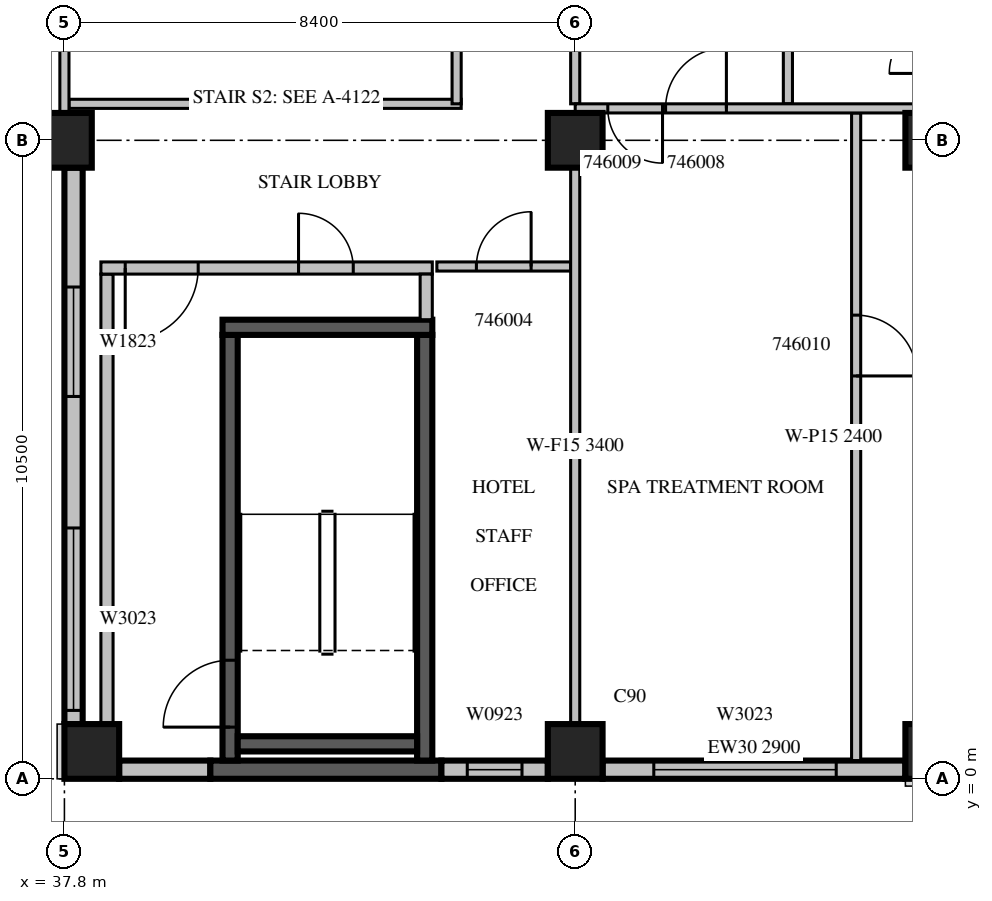
"""IFC4 building model, lengths in metres.
Left out: names, types, materials, properties, quantities, classifications, styles, units other than length and angle.
Written with IfcOpenShell. Run it as: python <this file> out.ifc"""

import sys

from ifc_helpers import new_model, si_unit, direction, frame, frame_2d, origin, origin_2d, place, context, subcontext, project, spatial, rectangle, extrude, source, transform, mapped, element, fill, save


model = new_model("IFC4")
c1 = context("Model", 3, precision=1e-05, world=origin(), true_north=direction((0.0, 1.0)))
c2 = subcontext(c1, "Body", "Model", "MODEL_VIEW")
j1 = project(units=[si_unit("LENGTHUNIT", "METRE"), si_unit("PLANEANGLEUNIT", "RADIAN")], contexts=[c1])
p1 = place(None, origin())
s1 = spatial("IfcSite", under=j1, at=p1, CompositionType="ELEMENT")
p2 = place(p1, origin())
s2 = spatial("IfcBuilding", under=s1, at=p2, CompositionType="ELEMENT")
p3 = place(p2, frame((0.0, 0.0, 208.2)))
s3 = spatial("IfcBuildingStorey", under=s2, at=p3, CompositionType="ELEMENT", Elevation=208.2)
m1 = source(origin(), c2, "Body", "SweptSolid", [
    extrude(rectangle(XDim=0.9, YDim=0.9, at=origin_2d()), origin(), (0.0, 0.0, 1.0), 3.8),
])
for number, where, z_axis, x_axis in (
    (1, (38.25, 0.45, 0.0), (0.0, 0.0, 1.0), (1.0, 0.0, 0.0)),
    (2, (46.2, 0.45, 0.0), (0.0, 0.0, 1.0), (1.0, 0.0, 0.0)),
    (3, (52.08, 0.45, 0.0), (0.0, 0.0, 1.0), (1.0, 0.0, 0.0)),
    (4, (37.8, 10.5, 0.0), (0.0, 0.0, 1.0), (1.0, 0.0, 0.0)),
    (5, (46.2, 10.5, 0.0), (0.0, 0.0, 1.0), (1.0, 0.0, 0.0)),
    (6, (52.08, 10.5, 0.0), (0.0, 0.0, 1.0), (1.0, 0.0, 0.0)),
):
    element("IfcColumn", number, at=place(p3, frame(where, z_axis=z_axis, x_axis=x_axis)), inside=s3, PredefinedType="COLUMN", context=c2, shape_type="MappedRepresentation", body=[
        mapped(m1, transform((0.0, 0.0, 0.0), scale=1.0)),
    ])
m2 = source(origin(), c2, "Body", "SweptSolid", [
    extrude(rectangle(XDim=9.15, YDim=0.3, at=frame_2d((4.575, 0.0))), origin(), (0.0, 0.0, 1.0), 3.4),
])
p4 = place(p3, frame((37.95, 10.05, 0.0), z_axis=(0.0, 0.0, 1.0), x_axis=(0.0, -1.0, 0.0)))
e7 = element("IfcWall", 7, at=p4, inside=s3, PredefinedType="STANDARD", context=c2, shape_type="MappedRepresentation", body=[
    mapped(m2, transform((0.0, 0.0, 0.0), scale=1.0)),
])
m3 = source(origin(), c2, "Body", "SweptSolid", [
    extrude(rectangle(XDim=1.8, YDim=2.3, at=frame_2d((0.9, 1.15))), frame((0.0, 0.16, 0.0), z_axis=(0.0, -1.0, 0.0), x_axis=(1.0, 0.0, 0.0)), (0.0, 0.0, 1.0), 0.32),
])
p5 = place(p4, frame((1.962, 0.0, 0.6)))
e8 = element("IfcOpeningElement", 8, at=p5, cuts=e7, PredefinedType="OPENING", context=c2, shape_type="MappedRepresentation", body=[
    mapped(m3, transform((0.0, 0.0, 0.0), scale=1.0)),
])
m4 = source(origin(), c2, "Body", "SweptSolid", [
    extrude(rectangle(XDim=3.0, YDim=2.3, at=frame_2d((1.5, 1.15))), frame((0.0, 0.16, 0.0), z_axis=(0.0, -1.0, 0.0), x_axis=(1.0, 0.0, 0.0)), (0.0, 0.0, 1.0), 0.32),
])
p6 = place(p4, frame((5.925, 0.0, 0.6)))
e9 = element("IfcOpeningElement", 9, at=p6, cuts=e7, PredefinedType="OPENING", context=c2, shape_type="MappedRepresentation", body=[
    mapped(m4, transform((0.0, 0.0, 0.0), scale=1.0)),
])
m5 = source(origin(), c2, "Body", "SweptSolid", [
    extrude(rectangle(XDim=1.5, YDim=0.3, at=frame_2d((0.75, 0.0))), origin(), (0.0, 0.0, 1.0), 3.4),
])
p7 = place(p3, frame((38.7, 0.15, 0.0), z_axis=(0.0, 0.0, 1.0), x_axis=(1.0, 0.0, 0.0)))
e10 = element("IfcWall", 10, at=p7, inside=s3, PredefinedType="STANDARD", context=c2, shape_type="MappedRepresentation", body=[
    mapped(m5, transform((0.0, 0.0, 0.0), scale=1.0)),
])
m6 = source(origin(), c2, "Body", "SweptSolid", [
    extrude(rectangle(XDim=3.8, YDim=0.3, at=frame_2d((1.9, 0.0))), origin(), (0.0, 0.0, 1.0), 3.4),
])
p8 = place(p3, frame((40.2, 0.15, 0.0), z_axis=(0.0, 0.0, 1.0), x_axis=(1.0, 0.0, 0.0)))
e11 = element("IfcWall", 11, at=p8, inside=s3, PredefinedType="SOLIDWALL", context=c2, shape_type="MappedRepresentation", body=[
    mapped(m6, transform((0.0, 0.0, 0.0), scale=1.0)),
])
m7 = source(origin(), c2, "Body", "SweptSolid", [
    extrude(rectangle(XDim=1.75, YDim=0.3, at=frame_2d((0.875, 0.0))), origin(), (0.0, 0.0, 1.0), 3.4),
])
p9 = place(p3, frame((44.0, 0.15, 0.0), z_axis=(0.0, 0.0, 1.0), x_axis=(1.0, 0.0, 0.0)))
e12 = element("IfcWall", 12, at=p9, inside=s3, PredefinedType="STANDARD", context=c2, shape_type="MappedRepresentation", body=[
    mapped(m7, transform((0.0, 0.0, 0.0), scale=1.0)),
])
m8 = source(origin(), c2, "Body", "SweptSolid", [
    extrude(rectangle(XDim=0.9, YDim=2.3, at=frame_2d((0.45, 1.15))), frame((0.0, 0.16, 0.0), z_axis=(0.0, -1.0, 0.0), x_axis=(1.0, 0.0, 0.0)), (0.0, 0.0, 1.0), 0.32),
])
p10 = place(p9, frame((0.425, 0.0, 0.6)))
e13 = element("IfcOpeningElement", 13, at=p10, cuts=e12, PredefinedType="OPENING", context=c2, shape_type="MappedRepresentation", body=[
    mapped(m8, transform((0.0, 0.0, 0.0), scale=1.0)),
])
m9 = source(origin(), c2, "Body", "SweptSolid", [
    extrude(rectangle(XDim=4.98, YDim=0.3, at=frame_2d((2.49, 0.0))), origin(), (0.0, 0.0, 1.0), 2.9),
])
p11 = place(p3, frame((46.65, 0.15, 0.0), z_axis=(0.0, 0.0, 1.0), x_axis=(1.0, 0.0, 0.0)))
e14 = element("IfcWall", 14, at=p11, inside=s3, PredefinedType="STANDARD", context=c2, shape_type="MappedRepresentation", body=[
    mapped(m9, transform((0.0, 0.0, 0.0), scale=1.0)),
])
p12 = place(p11, frame((0.843, 0.0, 0.6)))
e15 = element("IfcOpeningElement", 15, at=p12, cuts=e14, PredefinedType="OPENING", context=c2, shape_type="MappedRepresentation", body=[
    mapped(m4, transform((0.0, 0.0, 0.0), scale=1.0)),
])
m10 = source(origin(), c2, "Body", "SweptSolid", [
    extrude(rectangle(XDim=7.0, YDim=0.25, at=frame_2d((3.5, 0.0))), origin(), (0.0, 0.0, 1.0), 3.4),
])
p13 = place(p3, frame((40.525, 0.3, 0.0), z_axis=(0.0, 0.0, 1.0), x_axis=(0.0, 1.0, 0.0)))
e16 = element("IfcWall", 16, at=p13, inside=s3, PredefinedType="SOLIDWALL", context=c2, shape_type="MappedRepresentation", body=[
    mapped(m10, transform((0.0, 0.0, 0.0), scale=1.0)),
])
m11 = source(origin(), c2, "Body", "SweptSolid", [
    extrude(rectangle(XDim=1.1, YDim=2.1, at=frame_2d((0.55, 1.05))), frame((0.0, 0.135, 0.0), z_axis=(0.0, -1.0, 0.0), x_axis=(1.0, 0.0, 0.0)), (0.0, 0.0, 1.0), 0.27),
])
p14 = place(p13, frame((0.55, 0.0, 0.0)))
e17 = element("IfcOpeningElement", 17, at=p14, cuts=e16, PredefinedType="OPENING", context=c2, shape_type="MappedRepresentation", body=[
    mapped(m11, transform((0.0, 0.0, 0.0), scale=1.0)),
])
p15 = place(p3, frame((43.725, 0.3, 0.0), z_axis=(0.0, 0.0, 1.0), x_axis=(0.0, 1.0, 0.0)))
e18 = element("IfcWall", 18, at=p15, inside=s3, PredefinedType="SOLIDWALL", context=c2, shape_type="MappedRepresentation", body=[
    mapped(m10, transform((0.0, 0.0, 0.0), scale=1.0)),
])
m12 = source(origin(), c2, "Body", "SweptSolid", [
    extrude(rectangle(XDim=3.45, YDim=0.25, at=frame_2d((1.725, 0.0))), origin(), (0.0, 0.0, 1.0), 3.4),
])
p16 = place(p3, frame((40.4, 7.425, 0.0), z_axis=(0.0, 0.0, 1.0), x_axis=(1.0, 0.0, 0.0)))
e19 = element("IfcWall", 19, at=p16, inside=s3, PredefinedType="SOLIDWALL", context=c2, shape_type="MappedRepresentation", body=[
    mapped(m12, transform((0.0, 0.0, 0.0), scale=1.0)),
])
m13 = source(origin(), c2, "Body", "SweptSolid", [
    extrude(rectangle(XDim=2.95, YDim=0.25, at=frame_2d((1.475, 0.0))), origin(), (0.0, 0.0, 1.0), 3.4),
])
p17 = place(p3, frame((40.65, 0.575, 0.0), z_axis=(0.0, 0.0, 1.0), x_axis=(1.0, 0.0, 0.0)))
e20 = element("IfcWall", 20, at=p17, inside=s3, PredefinedType="SOLIDWALL", context=c2, shape_type="MappedRepresentation", body=[
    mapped(m13, transform((0.0, 0.0, 0.0), scale=1.0)),
])
m14 = source(origin(), c2, "Body", "SweptSolid", [
    extrude(rectangle(XDim=8.0, YDim=0.2, at=frame_2d((4.0, 0.0))), origin(), (0.0, 0.0, 1.0), 3.4),
])
p18 = place(p3, frame((38.5, 0.3, 0.0), z_axis=(0.0, 0.0, 1.0), x_axis=(0.0, 1.0, 0.0)))
e21 = element("IfcWall", 21, at=p18, inside=s3, PredefinedType="PARTITIONING", context=c2, shape_type="MappedRepresentation", body=[
    mapped(m14, transform((0.0, 0.0, 0.0), scale=1.0)),
])
m15 = source(origin(), c2, "Body", "SweptSolid", [
    extrude(rectangle(XDim=5.45, YDim=0.2, at=frame_2d((2.725, 0.0))), origin(), (0.0, 0.0, 1.0), 3.4),
])
p19 = place(p3, frame((38.4, 8.4, 0.0), z_axis=(0.0, 0.0, 1.0), x_axis=(1.0, 0.0, 0.0)))
e22 = element("IfcWall", 22, at=p19, inside=s3, PredefinedType="PARTITIONING", context=c2, shape_type="MappedRepresentation", body=[
    mapped(m15, transform((0.0, 0.0, 0.0), scale=1.0)),
])
m16 = source(origin(), c2, "Body", "SweptSolid", [
    extrude(rectangle(XDim=1.2, YDim=2.1, at=frame_2d((0.6, 1.05))), frame((0.0, 0.11, 0.0), z_axis=(0.0, -1.0, 0.0), x_axis=(1.0, 0.0, 0.0)), (0.0, 0.0, 1.0), 0.22),
])
p20 = place(p19, frame((0.4, 0.0, 0.0)))
e23 = element("IfcOpeningElement", 23, at=p20, cuts=e22, PredefinedType="OPENING", context=c2, shape_type="MappedRepresentation", body=[
    mapped(m16, transform((0.0, 0.0, 0.0), scale=1.0)),
])
m17 = source(origin(), c2, "Body", "SweptSolid", [
    extrude(rectangle(XDim=0.9, YDim=2.1, at=frame_2d((0.45, 1.05))), frame((0.0, 0.11, 0.0), z_axis=(0.0, -1.0, 0.0), x_axis=(1.0, 0.0, 0.0)), (0.0, 0.0, 1.0), 0.22),
])
p21 = place(p19, frame((3.25, 0.0, 0.0)))
e24 = element("IfcOpeningElement", 24, at=p21, cuts=e22, PredefinedType="OPENING", context=c2, shape_type="MappedRepresentation", body=[
    mapped(m17, transform((0.0, 0.0, 0.0), scale=1.0)),
])
m18 = source(origin(), c2, "Body", "SweptSolid", [
    extrude(rectangle(XDim=0.75, YDim=0.2, at=frame_2d((0.375, 0.0))), origin(), (0.0, 0.0, 1.0), 3.4),
])
p22 = place(p3, frame((43.75, 7.55, 0.0), z_axis=(0.0, 0.0, 1.0), x_axis=(0.0, 1.0, 0.0)))
e25 = element("IfcWall", 25, at=p22, inside=s3, PredefinedType="PARTITIONING", context=c2, shape_type="MappedRepresentation", body=[
    mapped(m18, transform((0.0, 0.0, 0.0), scale=1.0)),
])
m19 = source(origin(), c2, "Body", "SweptSolid", [
    extrude(rectangle(XDim=6.45, YDim=0.15, at=frame_2d((3.225, 0.0))), origin(), (0.0, 0.0, 1.0), 3.4),
])
p23 = place(p3, frame((37.875, 11.1, 0.0), z_axis=(0.0, 0.0, 1.0), x_axis=(1.0, 0.0, 0.0)))
e26 = element("IfcWall", 26, at=p23, inside=s3, PredefinedType="PARTITIONING", context=c2, shape_type="MappedRepresentation", body=[
    mapped(m19, transform((0.0, 0.0, 0.0), scale=1.0)),
])
m20 = source(origin(), c2, "Body", "SweptSolid", [
    extrude(rectangle(XDim=3.975, YDim=0.15, at=frame_2d((1.988, 0.0))), origin(), (0.0, 0.0, 1.0), 3.4),
])
p24 = place(p3, frame((44.25, 11.1, 0.0), z_axis=(0.0, 0.0, 1.0), x_axis=(0.0, 1.0, 0.0)))
e27 = element("IfcWall", 27, at=p24, inside=s3, PredefinedType="PARTITIONING", context=c2, shape_type="MappedRepresentation", body=[
    mapped(m20, transform((0.0, 0.0, 0.0), scale=1.0)),
])
m21 = source(origin(), c2, "Body", "SweptSolid", [
    extrude(rectangle(XDim=2.2, YDim=0.15, at=frame_2d((1.1, 0.0))), origin(), (0.0, 0.0, 1.0), 3.4),
])
p25 = place(p3, frame((46.125, 8.425, 0.0), z_axis=(0.0, 0.0, 1.0), x_axis=(-1.0, 0.0, 0.0)))
e28 = element("IfcWall", 28, at=p25, inside=s3, PredefinedType="PARTITIONING", context=c2, shape_type="MappedRepresentation", body=[
    mapped(m21, transform((0.0, 0.0, 0.0), scale=1.0)),
])
m22 = source(origin(), c2, "Body", "SweptSolid", [
    extrude(rectangle(XDim=0.9, YDim=2.1, at=frame_2d((0.45, 1.05))), frame((0.0, 0.085, 0.0), z_axis=(0.0, -1.0, 0.0), x_axis=(1.0, 0.0, 0.0)), (0.0, 0.0, 1.0), 0.17),
])
p26 = place(p25, frame((0.65, 0.0, 0.0)))
e29 = element("IfcOpeningElement", 29, at=p26, cuts=e28, PredefinedType="OPENING", context=c2, shape_type="MappedRepresentation", body=[
    mapped(m22, transform((0.0, 0.0, 0.0), scale=1.0)),
])
m23 = source(origin(), c2, "Body", "SweptSolid", [
    extrude(rectangle(XDim=4.051, YDim=0.15, at=frame_2d((2.026, 0.0))), origin(), (0.0, 0.0, 1.0), 3.4),
])
p27 = place(p3, frame((37.8, 10.949, 0.0), z_axis=(0.0, 0.0, 1.0), x_axis=(0.0, 1.0, 0.0)))
e30 = element("IfcWall", 30, at=p27, inside=s3, PredefinedType="PARTITIONING", context=c2, shape_type="MappedRepresentation", body=[
    mapped(m23, transform((0.0, 0.0, 0.0), scale=1.0)),
])
p28 = place(p3, frame((50.82, 0.3, 0.0), z_axis=(0.0, 0.0, 1.0), x_axis=(0.0, 1.0, 0.0)))
e31 = element("IfcWall", 31, at=p28, inside=s3, PredefinedType="PARTITIONING", context=c2, shape_type="SweptSolid", body=[
    extrude(rectangle(XDim=10.65, YDim=0.15, at=frame_2d((5.325, 0.0))), origin(), (0.0, 0.0, 1.0), 2.4),
])
m24 = source(origin(), c2, "Body", "SweptSolid", [
    extrude(rectangle(XDim=1.0, YDim=2.1, at=frame_2d((0.5, 1.05))), frame((0.0, 0.085, 0.0), z_axis=(0.0, -1.0, 0.0), x_axis=(1.0, 0.0, 0.0)), (0.0, 0.0, 1.0), 0.17),
])
p29 = place(p28, frame((6.325, 0.0, 0.0)))
e32 = element("IfcOpeningElement", 32, at=p29, cuts=e31, PredefinedType="OPENING", context=c2, shape_type="MappedRepresentation", body=[
    mapped(m24, transform((0.0, 0.0, 0.0), scale=1.0)),
])
m25 = source(origin(), c2, "Body", "SweptSolid", [
    extrude(rectangle(XDim=3.9, YDim=0.15, at=frame_2d((1.95, 0.0))), origin(), (0.0, 0.0, 1.0), 3.4),
])
p30 = place(p3, frame((49.698, 11.1, 0.0), z_axis=(0.0, 0.0, 1.0), x_axis=(0.0, 1.0, 0.0)))
e33 = element("IfcWall", 33, at=p30, inside=s3, PredefinedType="PARTITIONING", context=c2, shape_type="MappedRepresentation", body=[
    mapped(m25, transform((0.0, 0.0, 0.0), scale=1.0)),
])
m26 = source(origin(), c2, "Body", "SweptSolid", [
    extrude(rectangle(XDim=9.152, YDim=0.15, at=frame_2d((4.576, 0.0))), origin(), (0.0, 0.0, 1.0), 3.4),
])
p31 = place(p3, frame((46.2, 0.899, 0.0), z_axis=(0.0, 0.0, 1.0), x_axis=(0.0, 1.0, 0.0)))
e34 = element("IfcWall", 34, at=p31, inside=s3, PredefinedType="PARTITIONING", context=c2, shape_type="MappedRepresentation", body=[
    mapped(m26, transform((0.0, 0.0, 0.0), scale=1.0)),
])
p32 = place(p3, frame((46.2, 11.1, 0.0), z_axis=(0.0, 0.0, 1.0), x_axis=(0.0, 1.0, 0.0)))
e35 = element("IfcWall", 35, at=p32, inside=s3, PredefinedType="PARTITIONING", context=c2, shape_type="MappedRepresentation", body=[
    mapped(m25, transform((0.0, 0.0, 0.0), scale=1.0)),
])
m27 = source(origin(), c2, "Body", "SweptSolid", [
    extrude(rectangle(XDim=7.355, YDim=0.15, at=frame_2d((3.678, 0.0))), origin(), (0.0, 0.0, 1.0), 3.4),
])
p33 = place(p3, frame((53.555, 11.025, 0.0), z_axis=(0.0, 0.0, 1.0), x_axis=(-1.0, 0.0, 0.0)))
e36 = element("IfcWall", 36, at=p33, inside=s3, PredefinedType="PARTITIONING", context=c2, shape_type="MappedRepresentation", body=[
    mapped(m27, transform((0.0, 0.0, 0.0), scale=1.0)),
])
p34 = place(p33, frame((4.869, 0.0, 0.0)))
e37 = element("IfcOpeningElement", 37, at=p34, cuts=e36, PredefinedType="OPENING", context=c2, shape_type="MappedRepresentation", body=[
    mapped(m24, transform((0.0, 0.0, 0.0), scale=1.0)),
])
p35 = place(p33, frame((5.919, 0.0, 0.0)))
e38 = element("IfcOpeningElement", 38, at=p35, cuts=e36, PredefinedType="OPENING", context=c2, shape_type="MappedRepresentation", body=[
    mapped(m22, transform((0.0, 0.0, 0.0), scale=1.0)),
])
m28 = source(origin(), c2, "Body", "SweptSolid", [
    extrude(rectangle(XDim=1.8, YDim=2.3, at=frame_2d((0.9, 1.15))), frame((0.0, 0.03, 0.0), z_axis=(0.0, -1.0, 0.0), x_axis=(1.0, 0.0, 0.0)), (0.0, 0.0, 1.0), 0.06),
])
p36 = place(p5, origin())
e39 = element("IfcWindow", 39, at=p36, inside=s3, PartitioningType="SINGLE_PANEL", PredefinedType="WINDOW", context=c2, shape_type="MappedRepresentation", body=[
    mapped(m28, transform((0.0, 0.0, 0.0), scale=1.0)),
])
fill(e8, e39)
m29 = source(origin(), c2, "Body", "SweptSolid", [
    extrude(rectangle(XDim=3.0, YDim=2.3, at=frame_2d((1.5, 1.15))), frame((0.0, 0.03, 0.0), z_axis=(0.0, -1.0, 0.0), x_axis=(1.0, 0.0, 0.0)), (0.0, 0.0, 1.0), 0.06),
])
p37 = place(p6, origin())
e40 = element("IfcWindow", 40, at=p37, inside=s3, PartitioningType="SINGLE_PANEL", PredefinedType="WINDOW", context=c2, shape_type="MappedRepresentation", body=[
    mapped(m29, transform((0.0, 0.0, 0.0), scale=1.0)),
])
fill(e9, e40)
m30 = source(origin(), c2, "Body", "SweptSolid", [
    extrude(rectangle(XDim=0.9, YDim=2.3, at=frame_2d((0.45, 1.15))), frame((0.0, 0.03, 0.0), z_axis=(0.0, -1.0, 0.0), x_axis=(1.0, 0.0, 0.0)), (0.0, 0.0, 1.0), 0.06),
])
p38 = place(p10, origin())
e41 = element("IfcWindow", 41, at=p38, inside=s3, PartitioningType="SINGLE_PANEL", PredefinedType="WINDOW", context=c2, shape_type="MappedRepresentation", body=[
    mapped(m30, transform((0.0, 0.0, 0.0), scale=1.0)),
])
fill(e13, e41)
p39 = place(p12, origin())
e42 = element("IfcWindow", 42, at=p39, inside=s3, PartitioningType="SINGLE_PANEL", PredefinedType="WINDOW", context=c2, shape_type="MappedRepresentation", body=[
    mapped(m29, transform((0.0, 0.0, 0.0), scale=1.0)),
])
fill(e15, e42)
m31 = source(origin(), c2, "Body", "SweptSolid", [
    extrude(rectangle(XDim=1.1, YDim=2.1, at=frame_2d((0.55, 1.05))), frame((0.0, 0.025, 0.0), z_axis=(0.0, -1.0, 0.0), x_axis=(1.0, 0.0, 0.0)), (0.0, 0.0, 1.0), 0.05),
])
p40 = place(p14, origin())
e43 = element("IfcDoor", 43, at=p40, inside=s3, OperationType="SINGLE_SWING_LEFT", PredefinedType="DOOR", context=c2, shape_type="MappedRepresentation", body=[
    mapped(m31, transform((0.0, 0.0, 0.0), scale=1.0)),
])
fill(e17, e43)
m32 = source(origin(), c2, "Body", "SweptSolid", [
    extrude(rectangle(XDim=1.2, YDim=2.1, at=frame_2d((0.6, 1.05))), frame((0.0, 0.025, 0.0), z_axis=(0.0, -1.0, 0.0), x_axis=(1.0, 0.0, 0.0)), (0.0, 0.0, 1.0), 0.05),
])
p41 = place(p20, origin())
e44 = element("IfcDoor", 44, at=p41, inside=s3, OperationType="SINGLE_SWING_RIGHT", PredefinedType="DOOR", context=c2, shape_type="MappedRepresentation", body=[
    mapped(m32, transform((0.0, 0.0, 0.0), scale=1.0)),
])
fill(e23, e44)
m33 = source(origin(), c2, "Body", "SweptSolid", [
    extrude(rectangle(XDim=0.9, YDim=2.1, at=frame_2d((0.45, 1.05))), frame((0.0, 0.025, 0.0), z_axis=(0.0, -1.0, 0.0), x_axis=(1.0, 0.0, 0.0)), (0.0, 0.0, 1.0), 0.05),
])
p42 = place(p21, origin())
e45 = element("IfcDoor", 45, at=p42, inside=s3, OperationType="SINGLE_SWING_LEFT", PredefinedType="DOOR", context=c2, shape_type="MappedRepresentation", body=[
    mapped(m33, transform((0.0, 0.0, 0.0), scale=1.0)),
])
fill(e24, e45)
p43 = place(p26, origin())
e46 = element("IfcDoor", 46, at=p43, inside=s3, OperationType="SINGLE_SWING_RIGHT", PredefinedType="DOOR", context=c2, shape_type="MappedRepresentation", body=[
    mapped(m33, transform((0.0, 0.0, 0.0), scale=1.0)),
])
fill(e29, e46)
m34 = source(origin(), c2, "Body", "SweptSolid", [
    extrude(rectangle(XDim=1.0, YDim=2.1, at=frame_2d((0.5, 1.05))), frame((0.0, 0.025, 0.0), z_axis=(0.0, -1.0, 0.0), x_axis=(1.0, 0.0, 0.0)), (0.0, 0.0, 1.0), 0.05),
])
p44 = place(p34, origin())
e47 = element("IfcDoor", 47, at=p44, inside=s3, OperationType="SINGLE_SWING_RIGHT", PredefinedType="DOOR", context=c2, shape_type="MappedRepresentation", body=[
    mapped(m34, transform((0.0, 0.0, 0.0), scale=1.0)),
])
fill(e37, e47)
p45 = place(p35, origin())
e48 = element("IfcDoor", 48, at=p45, inside=s3, OperationType="SINGLE_SWING_LEFT", PredefinedType="DOOR", context=c2, shape_type="MappedRepresentation", body=[
    mapped(m33, transform((0.0, 0.0, 0.0), scale=1.0)),
])
fill(e38, e48)
p46 = place(p29, origin())
e49 = element("IfcDoor", 49, at=p46, inside=s3, OperationType="SINGLE_SWING_RIGHT", PredefinedType="DOOR", context=c2, shape_type="MappedRepresentation", body=[
    mapped(m34, transform((0.0, 0.0, 0.0), scale=1.0)),
])
fill(e32, e49)
save(model, sys.argv[1])
